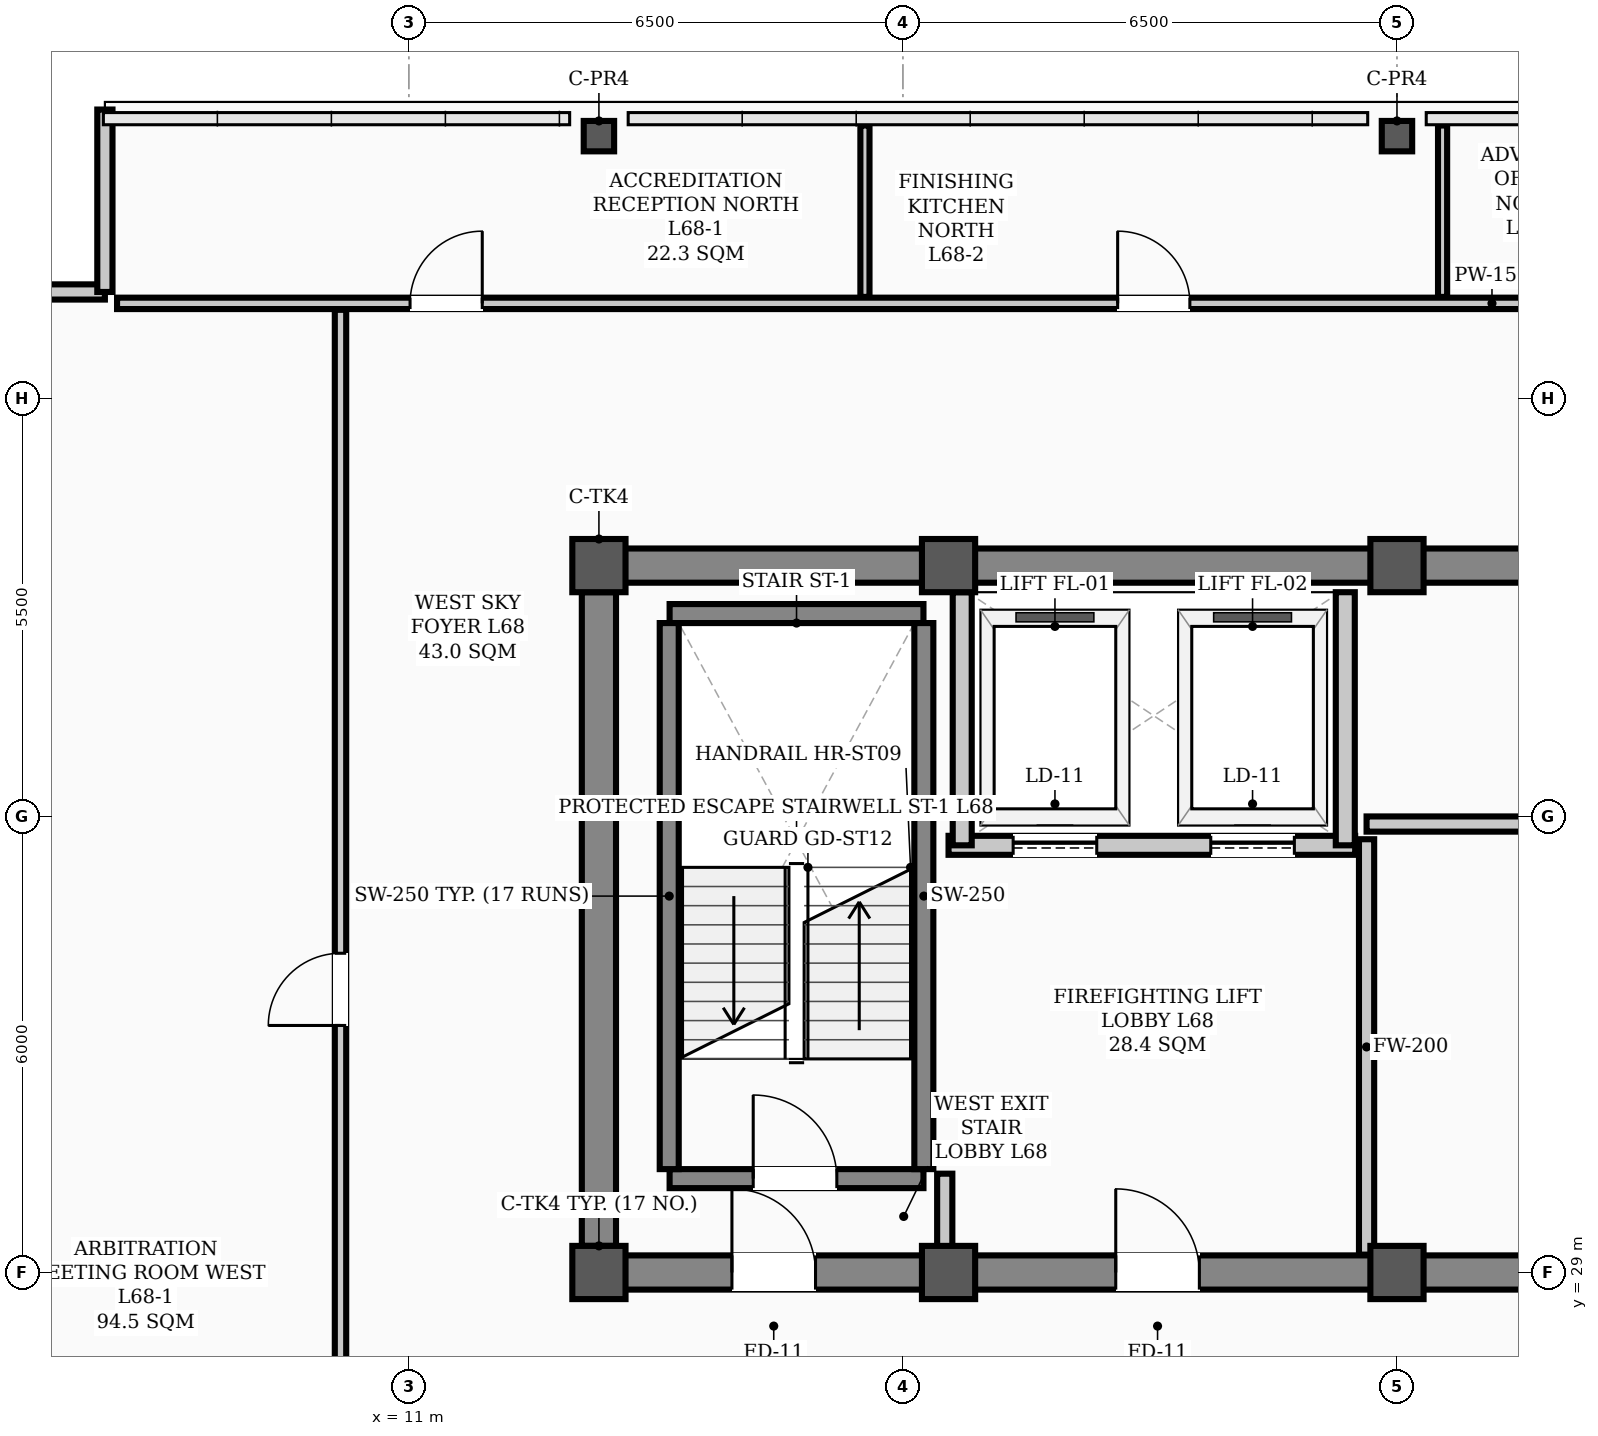
"""IFC4 building model, lengths in metres.
Left out: names, types, materials, properties, quantities, classifications, styles, units other than length and angle.
Written with IfcOpenShell. Run it as: python <this file> out.ifc"""

import sys

from ifc_helpers import new_model, si_unit, direction, frame, frame_2d, origin, origin_2d, place, context, subcontext, project, spatial, rectangle, hollow_rectangle, extrude, element, fill, save


model = new_model("IFC4")
c1 = context("Model", 3, precision=1e-05, world=origin(), true_north=direction((0.0, 1.0)))
c2 = subcontext(c1, "Body", "Model", "MODEL_VIEW")
j1 = project(units=[si_unit("LENGTHUNIT", "METRE"), si_unit("PLANEANGLEUNIT", "RADIAN")], contexts=[c1])
p1 = place(None, origin())
s1 = spatial("IfcSite", under=j1, at=p1, CompositionType="ELEMENT")
p2 = place(p1, origin())
s2 = spatial("IfcBuilding", under=s1, at=p2, CompositionType="ELEMENT")
p3 = place(p2, frame((0.0, 0.0, 273.5)))
s3 = spatial("IfcBuildingStorey", under=s2, at=p3, CompositionType="ELEMENT", Elevation=273.5)
for number, where, z_axis, x_axis in (
    (1, (13.5, 29.0, 0.0), (0.0, 0.0, 1.0), (1.0, 0.0, 0.0)),
    (2, (13.5, 38.3, 0.0), (0.0, 0.0, 1.0), (1.0, 0.0, 0.0)),
    (3, (18.1, 29.0, 0.0), (0.0, 0.0, 1.0), (1.0, 0.0, 0.0)),
    (4, (18.1, 38.3, 0.0), (0.0, 0.0, 1.0), (1.0, 0.0, 0.0)),
    (5, (24.0, 29.0, 0.0), (0.0, 0.0, 1.0), (1.0, 0.0, 0.0)),
    (6, (24.0, 38.3, 0.0), (0.0, 0.0, 1.0), (1.0, 0.0, 0.0)),
):
    element("IfcColumn", number, at=place(p3, frame(where, z_axis=z_axis, x_axis=x_axis)), inside=s3, PredefinedType="COLUMN", context=c2, shape_type="SweptSolid", body=[
        extrude(hollow_rectangle(XDim=0.7, YDim=0.7, WallThickness=0.028, InnerFilletRadius=0.014, OuterFilletRadius=0.042, at=origin_2d()), origin(), (0.0, 0.0, 1.0), 3.9),
    ])
for number, where, z_axis, x_axis in (
    (7, (13.5, 43.95, 0.0), (0.0, 0.0, 1.0), (1.0, 0.0, 0.0)),
    (8, (24.0, 43.95, 0.0), (0.0, 0.0, 1.0), (1.0, 0.0, 0.0)),
):
    element("IfcColumn", number, at=place(p3, frame(where, z_axis=z_axis, x_axis=x_axis)), inside=s3, PredefinedType="COLUMN", context=c2, shape_type="SweptSolid", body=[
        extrude(hollow_rectangle(XDim=0.4, YDim=0.4, WallThickness=0.02, InnerFilletRadius=0.02, OuterFilletRadius=0.04, at=origin_2d()), origin(), (0.0, 0.0, 1.0), 3.9),
    ])
p4 = place(p3, frame((4.6, 41.9, 0.0), z_axis=(0.0, 0.0, 1.0), x_axis=(1.0, 0.0, 0.0)))
e9 = element("IfcWall", 9, at=p4, inside=s3, PredefinedType="PARAPET", context=c2, shape_type="SweptSolid", body=[
    extrude(rectangle(XDim=2.4, YDim=0.2, at=frame_2d((1.2, 0.0))), origin(), (0.0, 0.0, 1.0), 1.2),
])
p5 = place(p3, frame((7.0, 41.9, 0.0), z_axis=(0.0, 0.0, 1.0), x_axis=(0.0, 1.0, 0.0)))
e10 = element("IfcWall", 10, at=p5, inside=s3, PredefinedType="PARAPET", context=c2, shape_type="SweptSolid", body=[
    extrude(rectangle(XDim=2.4, YDim=0.2, at=frame_2d((1.2, 0.0))), origin(), (0.0, 0.0, 1.0), 1.2),
])
p6 = place(p3, frame((13.5, 29.0, 0.0), z_axis=(0.0, 0.0, 1.0), x_axis=(1.0, 0.0, 0.0)))
e11 = element("IfcWall", 11, at=p6, inside=s3, PredefinedType="SHEAR", context=c2, shape_type="SweptSolid", body=[
    extrude(rectangle(XDim=30.5, YDim=0.45, at=frame_2d((15.25, 0.0))), origin(), (0.0, 0.0, 1.0), 3.72),
])
p7 = place(p6, frame((1.75, 0.0, 0.0)))
e12 = element("IfcOpeningElement", 12, at=p7, cuts=e11, PredefinedType="OPENING", context=c2, shape_type="SweptSolid", body=[
    extrude(rectangle(XDim=1.1, YDim=2.08, at=frame_2d((0.55, 1.04))), frame((0.0, 0.235, 0.0), z_axis=(0.0, -1.0, 0.0), x_axis=(1.0, 0.0, 0.0)), (0.0, 0.0, 1.0), 0.47),
])
p8 = place(p6, frame((26.7, 0.0, 0.0)))
e13 = element("IfcOpeningElement", 13, at=p8, cuts=e11, PredefinedType="OPENING", context=c2, shape_type="SweptSolid", body=[
    extrude(rectangle(XDim=1.1, YDim=2.08, at=frame_2d((0.55, 1.04))), frame((0.0, 0.235, 0.0), z_axis=(0.0, -1.0, 0.0), x_axis=(1.0, 0.0, 0.0)), (0.0, 0.0, 1.0), 0.47),
])
p9 = place(p6, frame((6.8, 0.0, 0.0)))
e14 = element("IfcOpeningElement", 14, at=p9, cuts=e11, PredefinedType="OPENING", context=c2, shape_type="SweptSolid", body=[
    extrude(rectangle(XDim=1.1, YDim=2.08, at=frame_2d((0.55, 1.04))), frame((0.0, 0.235, 0.0), z_axis=(0.0, -1.0, 0.0), x_axis=(1.0, 0.0, 0.0)), (0.0, 0.0, 1.0), 0.47),
])
p10 = place(p6, frame((13.2, 0.0, 0.0)))
e15 = element("IfcOpeningElement", 15, at=p10, cuts=e11, PredefinedType="OPENING", context=c2, shape_type="SweptSolid", body=[
    extrude(rectangle(XDim=1.6, YDim=2.08, at=frame_2d((0.8, 1.04))), frame((0.0, 0.235, 0.0), z_axis=(0.0, -1.0, 0.0), x_axis=(1.0, 0.0, 0.0)), (0.0, 0.0, 1.0), 0.47),
])
p11 = place(p6, frame((19.53, 0.0, 0.0)))
e16 = element("IfcOpeningElement", 16, at=p11, cuts=e11, PredefinedType="OPENING", context=c2, shape_type="SweptSolid", body=[
    extrude(rectangle(XDim=0.9, YDim=2.08, at=frame_2d((0.45, 1.04))), frame((0.0, 0.235, 0.0), z_axis=(0.0, -1.0, 0.0), x_axis=(1.0, 0.0, 0.0)), (0.0, 0.0, 1.0), 0.47),
])
p12 = place(p6, frame((21.57, 0.0, 0.0)))
e17 = element("IfcOpeningElement", 17, at=p12, cuts=e11, PredefinedType="OPENING", context=c2, shape_type="SweptSolid", body=[
    extrude(rectangle(XDim=0.9, YDim=2.08, at=frame_2d((0.45, 1.04))), frame((0.0, 0.235, 0.0), z_axis=(0.0, -1.0, 0.0), x_axis=(1.0, 0.0, 0.0)), (0.0, 0.0, 1.0), 0.47),
])
p13 = place(p3, frame((13.5, 38.3, 0.0), z_axis=(0.0, 0.0, 1.0), x_axis=(1.0, 0.0, 0.0)))
e18 = element("IfcWall", 18, at=p13, inside=s3, PredefinedType="SHEAR", context=c2, shape_type="SweptSolid", body=[
    extrude(rectangle(XDim=30.5, YDim=0.45, at=frame_2d((15.25, 0.0))), origin(), (0.0, 0.0, 1.0), 3.72),
])
p14 = place(p3, frame((13.5, 29.35, 0.0), z_axis=(0.0, 0.0, 1.0), x_axis=(0.0, 1.0, 0.0)))
e19 = element("IfcWall", 19, at=p14, inside=s3, PredefinedType="SHEAR", context=c2, shape_type="SweptSolid", body=[
    extrude(rectangle(XDim=8.6, YDim=0.45, at=frame_2d((4.3, 0.0))), origin(), (0.0, 0.0, 1.0), 3.72),
])
p15 = place(p3, frame((14.43, 30.235, 0.0), z_axis=(0.0, 0.0, 1.0), x_axis=(1.0, 0.0, 0.0)))
e20 = element("IfcWall", 20, at=p15, inside=s3, PredefinedType="STANDARD", context=c2, shape_type="SweptSolid", body=[
    extrude(rectangle(XDim=3.34, YDim=0.25, at=frame_2d((1.67, 0.0))), origin(), (0.0, 0.0, 1.0), 3.72),
])
p16 = place(p15, frame((1.1, 0.0, 0.0)))
e21 = element("IfcOpeningElement", 21, at=p16, cuts=e20, PredefinedType="OPENING", context=c2, shape_type="SweptSolid", body=[
    extrude(rectangle(XDim=1.1, YDim=2.08, at=frame_2d((0.55, 1.04))), frame((0.0, 0.135, 0.0), z_axis=(0.0, -1.0, 0.0), x_axis=(1.0, 0.0, 0.0)), (0.0, 0.0, 1.0), 0.27),
])
p17 = place(p3, frame((14.43, 37.669, 0.0), z_axis=(0.0, 0.0, 1.0), x_axis=(1.0, 0.0, 0.0)))
e22 = element("IfcWall", 22, at=p17, inside=s3, PredefinedType="STANDARD", context=c2, shape_type="SweptSolid", body=[
    extrude(rectangle(XDim=3.34, YDim=0.25, at=frame_2d((1.67, 0.0))), origin(), (0.0, 0.0, 1.0), 3.72),
])
for number, where, z_axis, x_axis in (
    (23, (14.425, 30.36, 0.0), (0.0, 0.0, 1.0), (0.0, 1.0, 0.0)),
    (24, (17.775, 30.36, 0.0), (0.0, 0.0, 1.0), (0.0, 1.0, 0.0)),
):
    element("IfcWall", number, at=place(p3, frame(where, z_axis=z_axis, x_axis=x_axis)), inside=s3, PredefinedType="STANDARD", context=c2, shape_type="SweptSolid", body=[
        extrude(rectangle(XDim=7.184, YDim=0.25, at=frame_2d((3.592, 0.0))), origin(), (0.0, 0.0, 1.0), 3.72),
    ])
p18 = place(p3, frame((18.1, 34.62, 0.0), z_axis=(0.0, 0.0, 1.0), x_axis=(1.0, 0.0, 0.0)))
e25 = element("IfcWall", 25, at=p18, inside=s3, PredefinedType="STANDARD", context=c2, shape_type="SweptSolid", body=[
    extrude(rectangle(XDim=5.35, YDim=0.25, at=frame_2d((2.675, 0.0))), origin(), (0.0, 0.0, 1.0), 3.72),
])
p19 = place(p18, frame((0.85, 0.0, 0.0)))
e26 = element("IfcOpeningElement", 26, at=p19, cuts=e25, PredefinedType="OPENING", context=c2, shape_type="SweptSolid", body=[
    extrude(rectangle(XDim=1.1, YDim=2.08, at=frame_2d((0.55, 1.04))), frame((0.0, 0.135, 0.0), z_axis=(0.0, -1.0, 0.0), x_axis=(1.0, 0.0, 0.0)), (0.0, 0.0, 1.0), 0.27),
])
p20 = place(p18, frame((3.45, 0.0, 0.0)))
e27 = element("IfcOpeningElement", 27, at=p20, cuts=e25, PredefinedType="OPENING", context=c2, shape_type="SweptSolid", body=[
    extrude(rectangle(XDim=1.1, YDim=2.08, at=frame_2d((0.55, 1.04))), frame((0.0, 0.135, 0.0), z_axis=(0.0, -1.0, 0.0), x_axis=(1.0, 0.0, 0.0)), (0.0, 0.0, 1.0), 0.27),
])
for number, where, z_axis, x_axis in (
    (28, (18.28, 34.62, 0.0), (0.0, 0.0, 1.0), (0.0, 1.0, 0.0)),
    (29, (23.32, 34.62, 0.0), (0.0, 0.0, 1.0), (0.0, 1.0, 0.0)),
):
    element("IfcWall", number, at=place(p3, frame(where, z_axis=z_axis, x_axis=x_axis)), inside=s3, PredefinedType="STANDARD", context=c2, shape_type="SweptSolid", body=[
        extrude(rectangle(XDim=3.33, YDim=0.25, at=frame_2d((1.665, 0.0))), origin(), (0.0, 0.0, 1.0), 3.4),
    ])
p21 = place(p3, frame((23.6, 34.9, 0.0), z_axis=(0.0, 0.0, 1.0), x_axis=(1.0, 0.0, 0.0)))
e30 = element("IfcWall", 30, at=p21, inside=s3, PredefinedType="STANDARD", context=c2, shape_type="SweptSolid", body=[
    extrude(rectangle(XDim=8.18, YDim=0.2, at=frame_2d((4.09, 0.0))), origin(), (0.0, 0.0, 1.0), 3.72),
])
p22 = place(p21, frame((3.45, 0.0, 0.0)))
e31 = element("IfcOpeningElement", 31, at=p22, cuts=e30, PredefinedType="OPENING", context=c2, shape_type="SweptSolid", body=[
    extrude(rectangle(XDim=1.1, YDim=2.08, at=frame_2d((0.55, 1.04))), frame((0.0, 0.11, 0.0), z_axis=(0.0, -1.0, 0.0), x_axis=(1.0, 0.0, 0.0)), (0.0, 0.0, 1.0), 0.22),
])
p23 = place(p3, frame((7.16, 41.75, 0.0), z_axis=(0.0, 0.0, 1.0), x_axis=(1.0, 0.0, 0.0)))
e32 = element("IfcWall", 32, at=p23, inside=s3, PredefinedType="PARTITIONING", context=c2, shape_type="SweptSolid", body=[
    extrude(rectangle(XDim=36.18, YDim=0.15, at=frame_2d((18.09, 0.0))), origin(), (0.0, 0.0, 1.0), 3.2),
])
p24 = place(p23, frame((3.855, 0.0, 0.0)))
e33 = element("IfcOpeningElement", 33, at=p24, cuts=e32, PredefinedType="OPENING", context=c2, shape_type="SweptSolid", body=[
    extrude(rectangle(XDim=0.95, YDim=2.08, at=frame_2d((0.475, 1.04))), frame((0.0, 0.085, 0.0), z_axis=(0.0, -1.0, 0.0), x_axis=(1.0, 0.0, 0.0)), (0.0, 0.0, 1.0), 0.17),
])
p25 = place(p23, frame((13.165, 0.0, 0.0)))
e34 = element("IfcOpeningElement", 34, at=p25, cuts=e32, PredefinedType="OPENING", context=c2, shape_type="SweptSolid", body=[
    extrude(rectangle(XDim=0.95, YDim=2.08, at=frame_2d((0.475, 1.04))), frame((0.0, 0.085, 0.0), z_axis=(0.0, -1.0, 0.0), x_axis=(1.0, 0.0, 0.0)), (0.0, 0.0, 1.0), 0.17),
])
p26 = place(p23, frame((20.765, 0.0, 0.0)))
e35 = element("IfcOpeningElement", 35, at=p26, cuts=e32, PredefinedType="OPENING", context=c2, shape_type="SweptSolid", body=[
    extrude(rectangle(XDim=0.95, YDim=2.08, at=frame_2d((0.475, 1.04))), frame((0.0, 0.085, 0.0), z_axis=(0.0, -1.0, 0.0), x_axis=(1.0, 0.0, 0.0)), (0.0, 0.0, 1.0), 0.17),
])
p27 = place(p23, frame((28.365, 0.0, 0.0)))
e36 = element("IfcOpeningElement", 36, at=p27, cuts=e32, PredefinedType="OPENING", context=c2, shape_type="SweptSolid", body=[
    extrude(rectangle(XDim=0.95, YDim=2.08, at=frame_2d((0.475, 1.04))), frame((0.0, 0.085, 0.0), z_axis=(0.0, -1.0, 0.0), x_axis=(1.0, 0.0, 0.0)), (0.0, 0.0, 1.0), 0.17),
])
p28 = place(p23, frame((34.265, 0.0, 0.0)))
e37 = element("IfcOpeningElement", 37, at=p28, cuts=e32, PredefinedType="OPENING", context=c2, shape_type="SweptSolid", body=[
    extrude(rectangle(XDim=0.95, YDim=2.08, at=frame_2d((0.475, 1.04))), frame((0.0, 0.085, 0.0), z_axis=(0.0, -1.0, 0.0), x_axis=(1.0, 0.0, 0.0)), (0.0, 0.0, 1.0), 0.17),
])
p29 = place(p3, frame((18.05, 29.235, 0.0), z_axis=(0.0, 0.0, 1.0), x_axis=(0.0, 1.0, 0.0)))
e38 = element("IfcWall", 38, at=p29, inside=s3, PredefinedType="STANDARD", context=c2, shape_type="SweptSolid", body=[
    extrude(rectangle(XDim=1.065, YDim=0.2, at=frame_2d((0.532, 0.0))), origin(), (0.0, 0.0, 1.0), 3.4),
])
p30 = place(p3, frame((23.6, 29.235, 0.0), z_axis=(0.0, 0.0, 1.0), x_axis=(0.0, 1.0, 0.0)))
e39 = element("IfcWall", 39, at=p30, inside=s3, PredefinedType="STANDARD", context=c2, shape_type="SweptSolid", body=[
    extrude(rectangle(XDim=5.465, YDim=0.2, at=frame_2d((2.732, 0.0))), origin(), (0.0, 0.0, 1.0), 3.2),
])
p31 = place(p3, frame((10.1, 23.785, 0.0), z_axis=(0.0, 0.0, 1.0), x_axis=(0.0, 1.0, 0.0)))
e40 = element("IfcWall", 40, at=p31, inside=s3, PredefinedType="PARTITIONING", context=c2, shape_type="SweptSolid", body=[
    extrude(rectangle(XDim=17.88, YDim=0.15, at=frame_2d((8.94, 0.0))), origin(), (0.0, 0.0, 1.0), 3.1),
])
p32 = place(p31, frame((8.465, 0.0, 0.0)))
e41 = element("IfcOpeningElement", 41, at=p32, cuts=e40, PredefinedType="OPENING", context=c2, shape_type="SweptSolid", body=[
    extrude(rectangle(XDim=0.95, YDim=2.08, at=frame_2d((0.475, 1.04))), frame((0.0, 0.085, 0.0), z_axis=(0.0, -1.0, 0.0), x_axis=(1.0, 0.0, 0.0)), (0.0, 0.0, 1.0), 0.17),
])
p33 = place(p3, frame((17.0, 41.835, 0.0), z_axis=(0.0, 0.0, 1.0), x_axis=(0.0, 1.0, 0.0)))
e42 = element("IfcWall", 42, at=p33, inside=s3, PredefinedType="PARTITIONING", context=c2, shape_type="SweptSolid", body=[
    extrude(rectangle(XDim=2.255, YDim=0.12, at=frame_2d((1.127, 0.0))), origin(), (0.0, 0.0, 1.0), 3.212),
])
p34 = place(p3, frame((24.6, 41.835, 0.0), z_axis=(0.0, 0.0, 1.0), x_axis=(0.0, 1.0, 0.0)))
e43 = element("IfcWall", 43, at=p34, inside=s3, PredefinedType="PARTITIONING", context=c2, shape_type="SweptSolid", body=[
    extrude(rectangle(XDim=2.255, YDim=0.12, at=frame_2d((1.127, 0.0))), origin(), (0.0, 0.0, 1.0), 3.2),
])
p35 = place(p16, origin())
e44 = element("IfcDoor", 44, at=p35, inside=s3, OperationType="SINGLE_SWING_LEFT", PredefinedType="DOOR", context=c2, shape_type="SweptSolid", body=[
    extrude(rectangle(XDim=1.1, YDim=2.08, at=frame_2d((0.55, 1.04))), frame((0.0, 0.025, 0.0), z_axis=(0.0, -1.0, 0.0), x_axis=(1.0, 0.0, 0.0)), (0.0, 0.0, 1.0), 0.05),
])
fill(e21, e44)
p36 = place(p7, origin())
e45 = element("IfcDoor", 45, at=p36, inside=s3, OperationType="SINGLE_SWING_LEFT", PredefinedType="DOOR", context=c2, shape_type="SweptSolid", body=[
    extrude(rectangle(XDim=1.1, YDim=2.08, at=frame_2d((0.55, 1.04))), frame((0.0, 0.025, 0.0), z_axis=(0.0, -1.0, 0.0), x_axis=(1.0, 0.0, 0.0)), (0.0, 0.0, 1.0), 0.05),
])
fill(e12, e45)
p37 = place(p9, origin())
e46 = element("IfcDoor", 46, at=p37, inside=s3, OperationType="SINGLE_SWING_LEFT", PredefinedType="DOOR", context=c2, shape_type="SweptSolid", body=[
    extrude(rectangle(XDim=1.1, YDim=2.08, at=frame_2d((0.55, 1.04))), frame((0.0, 0.025, 0.0), z_axis=(0.0, -1.0, 0.0), x_axis=(1.0, 0.0, 0.0)), (0.0, 0.0, 1.0), 0.05),
])
fill(e14, e46)
p38 = place(p32, origin())
e47 = element("IfcDoor", 47, at=p38, inside=s3, OperationType="SINGLE_SWING_LEFT", PredefinedType="DOOR", context=c2, shape_type="SweptSolid", body=[
    extrude(rectangle(XDim=0.95, YDim=2.08, at=frame_2d((0.475, 1.04))), frame((0.0, 0.025, 0.0), z_axis=(0.0, -1.0, 0.0), x_axis=(1.0, 0.0, 0.0)), (0.0, 0.0, 1.0), 0.05),
])
fill(e41, e47)
p39 = place(p24, origin())
e48 = element("IfcDoor", 48, at=p39, inside=s3, OperationType="SINGLE_SWING_RIGHT", PredefinedType="DOOR", context=c2, shape_type="SweptSolid", body=[
    extrude(rectangle(XDim=0.95, YDim=2.08, at=frame_2d((0.475, 1.04))), frame((0.0, 0.025, 0.0), z_axis=(0.0, -1.0, 0.0), x_axis=(1.0, 0.0, 0.0)), (0.0, 0.0, 1.0), 0.05),
])
fill(e33, e48)
p40 = place(p25, origin())
e49 = element("IfcDoor", 49, at=p40, inside=s3, OperationType="SINGLE_SWING_LEFT", PredefinedType="DOOR", context=c2, shape_type="SweptSolid", body=[
    extrude(rectangle(XDim=0.95, YDim=2.08, at=frame_2d((0.475, 1.04))), frame((0.0, 0.025, 0.0), z_axis=(0.0, -1.0, 0.0), x_axis=(1.0, 0.0, 0.0)), (0.0, 0.0, 1.0), 0.05),
])
fill(e34, e49)
p41 = place(p19, origin())
e50 = element("IfcDoor", 50, at=p41, inside=s3, OperationType="SLIDING_TO_LEFT", PredefinedType="DOOR", context=c2, shape_type="SweptSolid", body=[
    extrude(rectangle(XDim=1.1, YDim=2.08, at=frame_2d((0.55, 1.04))), frame((0.0, 0.025, 0.0), z_axis=(0.0, -1.0, 0.0), x_axis=(1.0, 0.0, 0.0)), (0.0, 0.0, 1.0), 0.05),
])
fill(e26, e50)
p42 = place(p20, origin())
e51 = element("IfcDoor", 51, at=p42, inside=s3, OperationType="SLIDING_TO_LEFT", PredefinedType="DOOR", context=c2, shape_type="SweptSolid", body=[
    extrude(rectangle(XDim=1.1, YDim=2.08, at=frame_2d((0.55, 1.04))), frame((0.0, 0.025, 0.0), z_axis=(0.0, -1.0, 0.0), x_axis=(1.0, 0.0, 0.0)), (0.0, 0.0, 1.0), 0.05),
])
fill(e27, e51)
save(model, sys.argv[1])
